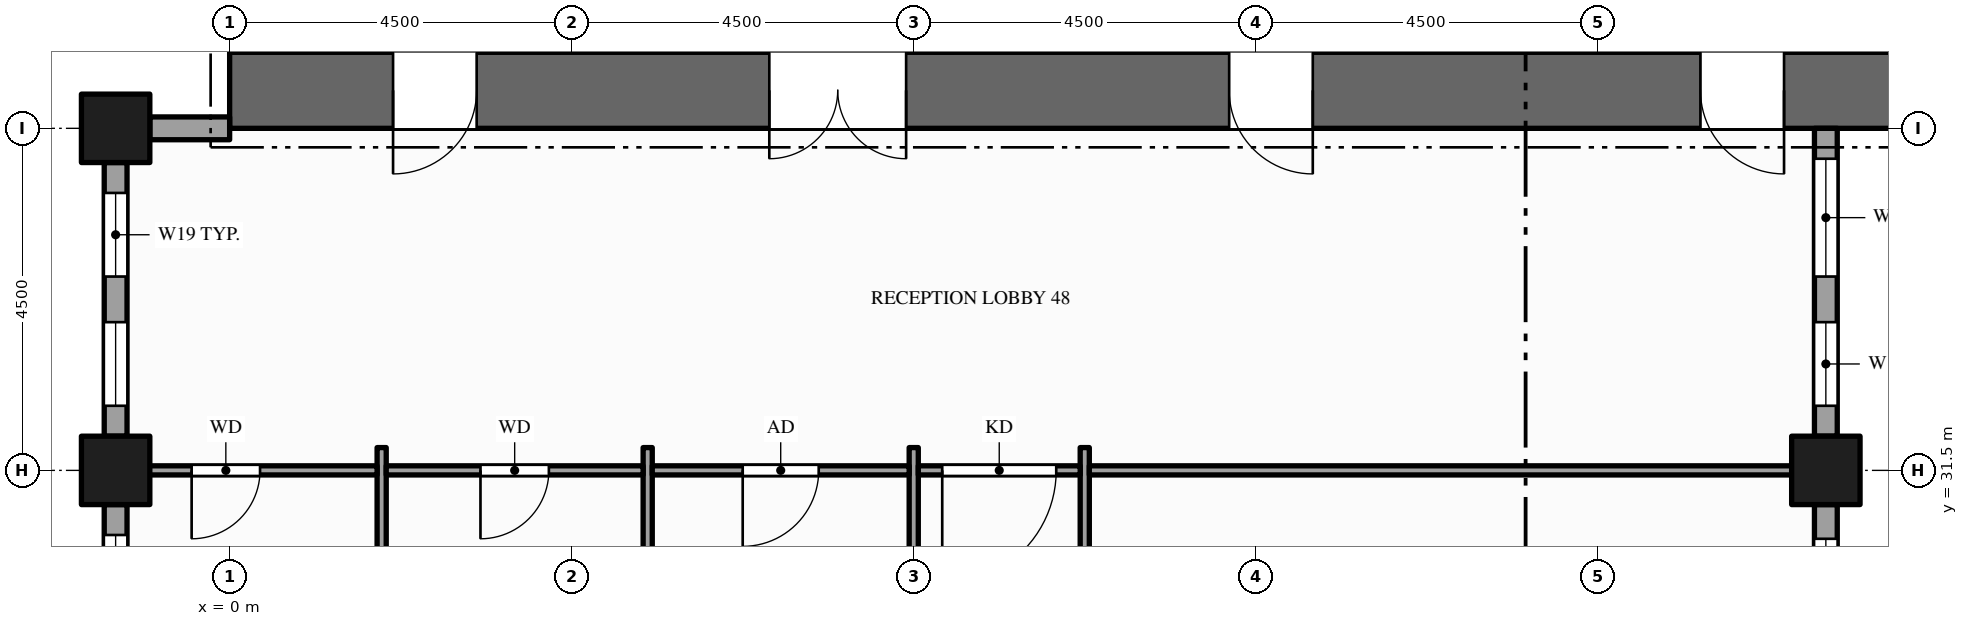
"""IFC4 building model, lengths in metres.
Left out: names, types, materials, properties, quantities, classifications, styles, units other than length and angle.
Written with IfcOpenShell. Run it as: python <this file> out.ifc"""

import sys

from ifc_helpers import new_model, si_unit, direction, frame, frame_2d, origin, origin_2d, place, context, subcontext, project, spatial, rectangle, hollow_rectangle, extrude, element, fill, save


model = new_model("IFC4")
c1 = context("Model", 3, precision=1e-05, world=origin(), true_north=direction((0.0, 1.0)))
c2 = subcontext(c1, "Body", "Model", "MODEL_VIEW")
j1 = project(units=[si_unit("LENGTHUNIT", "METRE"), si_unit("PLANEANGLEUNIT", "RADIAN")], contexts=[c1])
p1 = place(None, origin())
s1 = spatial("IfcSite", under=j1, at=p1, CompositionType="ELEMENT")
p2 = place(p1, origin())
s2 = spatial("IfcBuilding", under=s1, at=p2, CompositionType="ELEMENT")
p3 = place(p2, frame((0.0, 0.0, 143.0)))
s3 = spatial("IfcBuildingStorey", under=s2, at=p3, CompositionType="ELEMENT", Elevation=143.0)
p4 = place(p3, frame((0.0, 36.5, -0.15), z_axis=(0.0, 0.0, 1.0), x_axis=(1.0, 0.0, 0.0)))
e1 = element("IfcWall", 1, at=p4, inside=s3, PredefinedType="SHEAR", context=c2, shape_type="SweptSolid", body=[
    extrude(rectangle(XDim=22.5, YDim=1.0, at=frame_2d((11.25, 0.0))), origin(), (0.0, 0.0, 1.0), 4.0),
])
p5 = place(p4, frame((7.1, 0.0, 0.15)))
e2 = element("IfcOpeningElement", 2, at=p5, cuts=e1, PredefinedType="OPENING", context=c2, shape_type="SweptSolid", body=[
    extrude(rectangle(XDim=1.8, YDim=2.1, at=frame_2d((0.9, 1.05))), frame((0.0, 0.51, 0.0), z_axis=(0.0, -1.0, 0.0), x_axis=(1.0, 0.0, 0.0)), (0.0, 0.0, 1.0), 1.02),
])
p6 = place(p4, frame((13.15, 0.0, 0.15)))
e3 = element("IfcOpeningElement", 3, at=p6, cuts=e1, PredefinedType="OPENING", context=c2, shape_type="SweptSolid", body=[
    extrude(rectangle(XDim=1.1, YDim=2.1, at=frame_2d((0.55, 1.05))), frame((0.0, 0.51, 0.0), z_axis=(0.0, -1.0, 0.0), x_axis=(1.0, 0.0, 0.0)), (0.0, 0.0, 1.0), 1.02),
])
p7 = place(p4, frame((2.15, 0.0, 0.15)))
e4 = element("IfcOpeningElement", 4, at=p7, cuts=e1, PredefinedType="OPENING", context=c2, shape_type="SweptSolid", body=[
    extrude(rectangle(XDim=1.1, YDim=2.1, at=frame_2d((0.55, 1.05))), frame((0.0, 0.51, 0.0), z_axis=(0.0, -1.0, 0.0), x_axis=(1.0, 0.0, 0.0)), (0.0, 0.0, 1.0), 1.02),
])
p8 = place(p4, frame((19.35, 0.0, 0.15)))
e5 = element("IfcOpeningElement", 5, at=p8, cuts=e1, PredefinedType="OPENING", context=c2, shape_type="SweptSolid", body=[
    extrude(rectangle(XDim=1.1, YDim=2.1, at=frame_2d((0.55, 1.05))), frame((0.0, 0.51, 0.0), z_axis=(0.0, -1.0, 0.0), x_axis=(1.0, 0.0, 0.0)), (0.0, 0.0, 1.0), 1.02),
])
for number, where, z_axis, x_axis in (
    (6, (-1.5, 31.5, -0.15), (0.0, 0.0, 1.0), (1.0, 0.0, 0.0)),
    (7, (-1.5, 36.0, -0.15), (0.0, 0.0, 1.0), (1.0, 0.0, 0.0)),
    (8, (21.0, 31.5, -0.15), (0.0, 0.0, 1.0), (1.0, 0.0, 0.0)),
):
    element("IfcColumn", number, at=place(p3, frame(where, z_axis=z_axis, x_axis=x_axis)), inside=s3, PredefinedType="COLUMN", context=c2, shape_type="SweptSolid", body=[
        extrude(hollow_rectangle(XDim=0.9, YDim=0.9, WallThickness=0.045, at=origin_2d()), origin(), (0.0, 0.0, 1.0), 4.0),
    ])
p9 = place(p3, frame((21.0, 28.95, 0.0), z_axis=(0.0, 0.0, 1.0), x_axis=(0.0, 1.0, 0.0)))
e9 = element("IfcWall", 9, at=p9, inside=s3, PredefinedType="STANDARD", context=c2, shape_type="SweptSolid", body=[
    extrude(rectangle(XDim=2.1, YDim=0.3, at=frame_2d((1.05, 0.0))), origin(), (0.0, 0.0, 1.0), 3.149),
])
p10 = place(p9, frame((0.45, 0.0, 0.9)))
e10 = element("IfcOpeningElement", 10, at=p10, cuts=e9, PredefinedType="OPENING", context=c2, shape_type="SweptSolid", body=[
    extrude(rectangle(XDim=1.2, YDim=2.0, at=frame_2d((0.6, 1.0))), frame((0.0, 0.16, 0.0), z_axis=(0.0, -1.0, 0.0), x_axis=(1.0, 0.0, 0.0)), (0.0, 0.0, 1.0), 0.32),
])
p11 = place(p3, frame((21.0, 31.95, 0.0), z_axis=(0.0, 0.0, 1.0), x_axis=(0.0, 1.0, 0.0)))
e11 = element("IfcWall", 11, at=p11, inside=s3, PredefinedType="STANDARD", context=c2, shape_type="SweptSolid", body=[
    extrude(rectangle(XDim=4.05, YDim=0.3, at=frame_2d((2.025, 0.0))), origin(), (0.0, 0.0, 1.0), 3.149),
])
p12 = place(p11, frame((0.4, 0.0, 0.9)))
e12 = element("IfcOpeningElement", 12, at=p12, cuts=e11, PredefinedType="OPENING", context=c2, shape_type="SweptSolid", body=[
    extrude(rectangle(XDim=1.1, YDim=2.0, at=frame_2d((0.55, 1.0))), frame((0.0, 0.16, 0.0), z_axis=(0.0, -1.0, 0.0), x_axis=(1.0, 0.0, 0.0)), (0.0, 0.0, 1.0), 0.32),
])
p13 = place(p11, frame((2.1, 0.0, 0.9)))
e13 = element("IfcOpeningElement", 13, at=p13, cuts=e11, PredefinedType="OPENING", context=c2, shape_type="SweptSolid", body=[
    extrude(rectangle(XDim=1.55, YDim=2.0, at=frame_2d((0.775, 1.0))), frame((0.0, 0.16, 0.0), z_axis=(0.0, -1.0, 0.0), x_axis=(1.0, 0.0, 0.0)), (0.0, 0.0, 1.0), 0.32),
])
p14 = place(p3, frame((0.0, 36.0, 0.0), z_axis=(0.0, 0.0, 1.0), x_axis=(-1.0, 0.0, 0.0)))
e14 = element("IfcWall", 14, at=p14, inside=s3, PredefinedType="STANDARD", context=c2, shape_type="SweptSolid", body=[
    extrude(rectangle(XDim=1.05, YDim=0.3, at=frame_2d((0.525, 0.0))), origin(), (0.0, 0.0, 1.0), 2.87),
])
p15 = place(p3, frame((-1.5, 35.55, 0.0), z_axis=(0.0, 0.0, 1.0), x_axis=(0.0, -1.0, 0.0)))
e15 = element("IfcWall", 15, at=p15, inside=s3, PredefinedType="STANDARD", context=c2, shape_type="SweptSolid", body=[
    extrude(rectangle(XDim=3.6, YDim=0.3, at=frame_2d((1.8, 0.0))), origin(), (0.0, 0.0, 1.0), 3.149),
])
p16 = place(p15, frame((0.4, 0.0, 0.9)))
e16 = element("IfcOpeningElement", 16, at=p16, cuts=e15, PredefinedType="OPENING", context=c2, shape_type="SweptSolid", body=[
    extrude(rectangle(XDim=1.1, YDim=2.0, at=frame_2d((0.55, 1.0))), frame((0.0, 0.16, 0.0), z_axis=(0.0, -1.0, 0.0), x_axis=(1.0, 0.0, 0.0)), (0.0, 0.0, 1.0), 0.32),
])
p17 = place(p15, frame((2.1, 0.0, 0.9)))
e17 = element("IfcOpeningElement", 17, at=p17, cuts=e15, PredefinedType="OPENING", context=c2, shape_type="SweptSolid", body=[
    extrude(rectangle(XDim=1.1, YDim=2.0, at=frame_2d((0.55, 1.0))), frame((0.0, 0.16, 0.0), z_axis=(0.0, -1.0, 0.0), x_axis=(1.0, 0.0, 0.0)), (0.0, 0.0, 1.0), 0.32),
])
p18 = place(p3, frame((-1.5, 31.05, 0.0), z_axis=(0.0, 0.0, 1.0), x_axis=(0.0, -1.0, 0.0)))
e18 = element("IfcWall", 18, at=p18, inside=s3, PredefinedType="STANDARD", context=c2, shape_type="SweptSolid", body=[
    extrude(rectangle(XDim=3.6, YDim=0.3, at=frame_2d((1.8, 0.0))), origin(), (0.0, 0.0, 1.0), 3.149),
])
p19 = place(p18, frame((0.4, 0.0, 0.9)))
e19 = element("IfcOpeningElement", 19, at=p19, cuts=e18, PredefinedType="OPENING", context=c2, shape_type="SweptSolid", body=[
    extrude(rectangle(XDim=1.1, YDim=2.0, at=frame_2d((0.55, 1.0))), frame((0.0, 0.16, 0.0), z_axis=(0.0, -1.0, 0.0), x_axis=(1.0, 0.0, 0.0)), (0.0, 0.0, 1.0), 0.32),
])
p20 = place(p18, frame((2.1, 0.0, 0.9)))
e20 = element("IfcOpeningElement", 20, at=p20, cuts=e18, PredefinedType="OPENING", context=c2, shape_type="SweptSolid", body=[
    extrude(rectangle(XDim=1.1, YDim=2.0, at=frame_2d((0.55, 1.0))), frame((0.0, 0.16, 0.0), z_axis=(0.0, -1.0, 0.0), x_axis=(1.0, 0.0, 0.0)), (0.0, 0.0, 1.0), 0.32),
])
for number, where, z_axis, x_axis in (
    (21, (2.0, 26.7, 0.0), (0.0, 0.0, 1.0), (0.0, 1.0, 0.0)),
    (22, (5.5, 26.7, 0.0), (0.0, 0.0, 1.0), (0.0, 1.0, 0.0)),
):
    element("IfcWall", number, at=place(p3, frame(where, z_axis=z_axis, x_axis=x_axis)), inside=s3, PredefinedType="PARTITIONING", context=c2, shape_type="SweptSolid", body=[
        extrude(rectangle(XDim=5.1, YDim=0.12, at=frame_2d((2.55, 0.0))), origin(), (0.0, 0.0, 1.0), 3.85),
    ])
p21 = place(p3, frame((9.0, 10.95, 0.0), z_axis=(0.0, 0.0, 1.0), x_axis=(0.0, 1.0, 0.0)))
e23 = element("IfcWall", 23, at=p21, inside=s3, PredefinedType="PARTITIONING", context=c2, shape_type="SweptSolid", body=[
    extrude(rectangle(XDim=20.85, YDim=0.12, at=frame_2d((10.425, 0.0))), origin(), (0.0, 0.0, 1.0), 2.6),
])
p22 = place(p21, frame((2.05, 0.0, 0.0)))
e24 = element("IfcOpeningElement", 24, at=p22, cuts=e23, PredefinedType="OPENING", context=c2, shape_type="SweptSolid", body=[
    extrude(rectangle(XDim=1.0, YDim=2.1, at=frame_2d((0.5, 1.05))), frame((0.0, 0.07, 0.0), z_axis=(0.0, -1.0, 0.0), x_axis=(1.0, 0.0, 0.0)), (0.0, 0.0, 1.0), 0.14),
])
p23 = place(p21, frame((6.55, 0.0, 0.0)))
e25 = element("IfcOpeningElement", 25, at=p23, cuts=e23, PredefinedType="OPENING", context=c2, shape_type="SweptSolid", body=[
    extrude(rectangle(XDim=1.0, YDim=2.1, at=frame_2d((0.5, 1.05))), frame((0.0, 0.07, 0.0), z_axis=(0.0, -1.0, 0.0), x_axis=(1.0, 0.0, 0.0)), (0.0, 0.0, 1.0), 0.14),
])
p24 = place(p21, frame((11.805, 0.0, 0.0)))
e26 = element("IfcOpeningElement", 26, at=p24, cuts=e23, PredefinedType="OPENING", context=c2, shape_type="SweptSolid", body=[
    extrude(rectangle(XDim=1.8, YDim=2.1, at=frame_2d((0.9, 1.05))), frame((0.0, 0.07, 0.0), z_axis=(0.0, -1.0, 0.0), x_axis=(1.0, 0.0, 0.0)), (0.0, 0.0, 1.0), 0.14),
])
p25 = place(p3, frame((11.25, 10.95, 0.0), z_axis=(0.0, 0.0, 1.0), x_axis=(0.0, 1.0, 0.0)))
e27 = element("IfcWall", 27, at=p25, inside=s3, PredefinedType="PARTITIONING", context=c2, shape_type="SweptSolid", body=[
    extrude(rectangle(XDim=20.85, YDim=0.12, at=frame_2d((10.425, 0.0))), origin(), (0.0, 0.0, 1.0), 2.6),
])
p26 = place(p25, frame((17.8, 0.0, 0.0)))
e28 = element("IfcOpeningElement", 28, at=p26, cuts=e27, PredefinedType="OPENING", context=c2, shape_type="SweptSolid", body=[
    extrude(rectangle(XDim=1.0, YDim=2.1, at=frame_2d((0.5, 1.05))), frame((0.0, 0.07, 0.0), z_axis=(0.0, -1.0, 0.0), x_axis=(1.0, 0.0, 0.0)), (0.0, 0.0, 1.0), 0.14),
])
p27 = place(p25, frame((4.2, 0.0, 0.0)))
e29 = element("IfcOpeningElement", 29, at=p27, cuts=e27, PredefinedType="OPENING", context=c2, shape_type="SweptSolid", body=[
    extrude(rectangle(XDim=1.2, YDim=2.1, at=frame_2d((0.6, 1.05))), frame((0.0, 0.07, 0.0), z_axis=(0.0, -1.0, 0.0), x_axis=(1.0, 0.0, 0.0)), (0.0, 0.0, 1.0), 0.14),
])
p28 = place(p3, frame((-1.35, 31.5, 0.0), z_axis=(0.0, 0.0, 1.0), x_axis=(1.0, 0.0, 0.0)))
e30 = element("IfcWall", 30, at=p28, inside=s3, PredefinedType="PARTITIONING", context=c2, shape_type="SweptSolid", body=[
    extrude(rectangle(XDim=3.29, YDim=0.12, at=frame_2d((1.645, 0.0))), origin(), (0.0, 0.0, 1.0), 2.87),
])
p29 = place(p28, frame((0.85, 0.0, 0.0)))
e31 = element("IfcOpeningElement", 31, at=p29, cuts=e30, PredefinedType="OPENING", context=c2, shape_type="SweptSolid", body=[
    extrude(rectangle(XDim=0.9, YDim=2.1, at=frame_2d((0.45, 1.05))), frame((0.0, 0.07, 0.0), z_axis=(0.0, -1.0, 0.0), x_axis=(1.0, 0.0, 0.0)), (0.0, 0.0, 1.0), 0.14),
])
p30 = place(p3, frame((2.06, 31.5, 0.0), z_axis=(0.0, 0.0, 1.0), x_axis=(1.0, 0.0, 0.0)))
e32 = element("IfcWall", 32, at=p30, inside=s3, PredefinedType="PARTITIONING", context=c2, shape_type="SweptSolid", body=[
    extrude(rectangle(XDim=3.38, YDim=0.12, at=frame_2d((1.69, 0.0))), origin(), (0.0, 0.0, 1.0), 2.87),
])
p31 = place(p30, frame((1.24, 0.0, 0.0)))
e33 = element("IfcOpeningElement", 33, at=p31, cuts=e32, PredefinedType="OPENING", context=c2, shape_type="SweptSolid", body=[
    extrude(rectangle(XDim=0.9, YDim=2.1, at=frame_2d((0.45, 1.05))), frame((0.0, 0.07, 0.0), z_axis=(0.0, -1.0, 0.0), x_axis=(1.0, 0.0, 0.0)), (0.0, 0.0, 1.0), 0.14),
])
p32 = place(p3, frame((5.56, 31.5, 0.0), z_axis=(0.0, 0.0, 1.0), x_axis=(1.0, 0.0, 0.0)))
e34 = element("IfcWall", 34, at=p32, inside=s3, PredefinedType="PARTITIONING", context=c2, shape_type="SweptSolid", body=[
    extrude(rectangle(XDim=3.38, YDim=0.12, at=frame_2d((1.69, 0.0))), origin(), (0.0, 0.0, 1.0), 2.87),
])
p33 = place(p32, frame((1.19, 0.0, 0.0)))
e35 = element("IfcOpeningElement", 35, at=p33, cuts=e34, PredefinedType="OPENING", context=c2, shape_type="SweptSolid", body=[
    extrude(rectangle(XDim=1.0, YDim=2.1, at=frame_2d((0.5, 1.05))), frame((0.0, 0.07, 0.0), z_axis=(0.0, -1.0, 0.0), x_axis=(1.0, 0.0, 0.0)), (0.0, 0.0, 1.0), 0.14),
])
p34 = place(p3, frame((9.06, 31.5, 0.0), z_axis=(0.0, 0.0, 1.0), x_axis=(1.0, 0.0, 0.0)))
e36 = element("IfcWall", 36, at=p34, inside=s3, PredefinedType="PARTITIONING", context=c2, shape_type="SweptSolid", body=[
    extrude(rectangle(XDim=2.13, YDim=0.12, at=frame_2d((1.065, 0.0))), origin(), (0.0, 0.0, 1.0), 2.87),
])
p35 = place(p34, frame((0.315, 0.0, 0.0)))
e37 = element("IfcOpeningElement", 37, at=p35, cuts=e36, PredefinedType="OPENING", context=c2, shape_type="SweptSolid", body=[
    extrude(rectangle(XDim=1.5, YDim=2.1, at=frame_2d((0.75, 1.05))), frame((0.0, 0.07, 0.0), z_axis=(0.0, -1.0, 0.0), x_axis=(1.0, 0.0, 0.0)), (0.0, 0.0, 1.0), 0.14),
])
p36 = place(p3, frame((11.31, 31.5, 0.0), z_axis=(0.0, 0.0, 1.0), x_axis=(1.0, 0.0, 0.0)))
e38 = element("IfcWall", 38, at=p36, inside=s3, PredefinedType="PARTITIONING", context=c2, shape_type="SweptSolid", body=[
    extrude(rectangle(XDim=9.54, YDim=0.12, at=frame_2d((4.77, 0.0))), origin(), (0.0, 0.0, 1.0), 2.87),
])
p37 = place(p10, origin())
e39 = element("IfcWindow", 39, at=p37, inside=s3, PartitioningType="SINGLE_PANEL", PredefinedType="WINDOW", context=c2, shape_type="SweptSolid", body=[
    extrude(rectangle(XDim=1.2, YDim=2.0, at=frame_2d((0.6, 1.0))), frame((0.0, 0.03, 0.0), z_axis=(0.0, -1.0, 0.0), x_axis=(1.0, 0.0, 0.0)), (0.0, 0.0, 1.0), 0.06),
])
fill(e10, e39)
p38 = place(p12, origin())
e40 = element("IfcWindow", 40, at=p38, inside=s3, PartitioningType="SINGLE_PANEL", PredefinedType="WINDOW", context=c2, shape_type="SweptSolid", body=[
    extrude(rectangle(XDim=1.1, YDim=2.0, at=frame_2d((0.55, 1.0))), frame((0.0, 0.03, 0.0), z_axis=(0.0, -1.0, 0.0), x_axis=(1.0, 0.0, 0.0)), (0.0, 0.0, 1.0), 0.06),
])
fill(e12, e40)
p39 = place(p13, origin())
e41 = element("IfcWindow", 41, at=p39, inside=s3, PartitioningType="SINGLE_PANEL", PredefinedType="WINDOW", context=c2, shape_type="SweptSolid", body=[
    extrude(rectangle(XDim=1.55, YDim=2.0, at=frame_2d((0.775, 1.0))), frame((0.0, 0.03, 0.0), z_axis=(0.0, -1.0, 0.0), x_axis=(1.0, 0.0, 0.0)), (0.0, 0.0, 1.0), 0.06),
])
fill(e13, e41)
p40 = place(p16, origin())
e42 = element("IfcWindow", 42, at=p40, inside=s3, PartitioningType="SINGLE_PANEL", PredefinedType="WINDOW", context=c2, shape_type="SweptSolid", body=[
    extrude(rectangle(XDim=1.1, YDim=2.0, at=frame_2d((0.55, 1.0))), frame((0.0, 0.03, 0.0), z_axis=(0.0, -1.0, 0.0), x_axis=(1.0, 0.0, 0.0)), (0.0, 0.0, 1.0), 0.06),
])
fill(e16, e42)
p41 = place(p17, origin())
e43 = element("IfcWindow", 43, at=p41, inside=s3, PartitioningType="SINGLE_PANEL", PredefinedType="WINDOW", context=c2, shape_type="SweptSolid", body=[
    extrude(rectangle(XDim=1.1, YDim=2.0, at=frame_2d((0.55, 1.0))), frame((0.0, 0.03, 0.0), z_axis=(0.0, -1.0, 0.0), x_axis=(1.0, 0.0, 0.0)), (0.0, 0.0, 1.0), 0.06),
])
fill(e17, e43)
p42 = place(p19, origin())
e44 = element("IfcWindow", 44, at=p42, inside=s3, PartitioningType="SINGLE_PANEL", PredefinedType="WINDOW", context=c2, shape_type="SweptSolid", body=[
    extrude(rectangle(XDim=1.1, YDim=2.0, at=frame_2d((0.55, 1.0))), frame((0.0, 0.03, 0.0), z_axis=(0.0, -1.0, 0.0), x_axis=(1.0, 0.0, 0.0)), (0.0, 0.0, 1.0), 0.06),
])
fill(e19, e44)
p43 = place(p5, origin())
e45 = element("IfcDoor", 45, at=p43, inside=s3, OperationType="DOUBLE_DOOR_SINGLE_SWING", PredefinedType="DOOR", context=c2, shape_type="SweptSolid", body=[
    extrude(rectangle(XDim=1.8, YDim=2.1, at=frame_2d((0.9, 1.05))), frame((0.0, 0.025, 0.0), z_axis=(0.0, -1.0, 0.0), x_axis=(1.0, 0.0, 0.0)), (0.0, 0.0, 1.0), 0.05),
])
fill(e2, e45)
p44 = place(p6, origin())
e46 = element("IfcDoor", 46, at=p44, inside=s3, OperationType="SINGLE_SWING_RIGHT", PredefinedType="DOOR", context=c2, shape_type="SweptSolid", body=[
    extrude(rectangle(XDim=1.1, YDim=2.1, at=frame_2d((0.55, 1.05))), frame((0.0, 0.025, 0.0), z_axis=(0.0, -1.0, 0.0), x_axis=(1.0, 0.0, 0.0)), (0.0, 0.0, 1.0), 0.05),
])
fill(e3, e46)
p45 = place(p7, origin())
e47 = element("IfcDoor", 47, at=p45, inside=s3, OperationType="SINGLE_SWING_LEFT", PredefinedType="DOOR", context=c2, shape_type="SweptSolid", body=[
    extrude(rectangle(XDim=1.1, YDim=2.1, at=frame_2d((0.55, 1.05))), frame((0.0, 0.025, 0.0), z_axis=(0.0, -1.0, 0.0), x_axis=(1.0, 0.0, 0.0)), (0.0, 0.0, 1.0), 0.05),
])
fill(e4, e47)
p46 = place(p8, origin())
e48 = element("IfcDoor", 48, at=p46, inside=s3, OperationType="SINGLE_SWING_RIGHT", PredefinedType="DOOR", context=c2, shape_type="SweptSolid", body=[
    extrude(rectangle(XDim=1.1, YDim=2.1, at=frame_2d((0.55, 1.05))), frame((0.0, 0.025, 0.0), z_axis=(0.0, -1.0, 0.0), x_axis=(1.0, 0.0, 0.0)), (0.0, 0.0, 1.0), 0.05),
])
fill(e5, e48)
p47 = place(p35, origin())
e49 = element("IfcDoor", 49, at=p47, inside=s3, OperationType="SINGLE_SWING_LEFT", PredefinedType="DOOR", context=c2, shape_type="SweptSolid", body=[
    extrude(rectangle(XDim=1.5, YDim=2.1, at=frame_2d((0.75, 1.05))), frame((0.0, 0.025, 0.0), z_axis=(0.0, -1.0, 0.0), x_axis=(1.0, 0.0, 0.0)), (0.0, 0.0, 1.0), 0.05),
])
fill(e37, e49)
p48 = place(p29, origin())
e50 = element("IfcDoor", 50, at=p48, inside=s3, OperationType="SINGLE_SWING_LEFT", PredefinedType="DOOR", context=c2, shape_type="SweptSolid", body=[
    extrude(rectangle(XDim=0.9, YDim=2.1, at=frame_2d((0.45, 1.05))), frame((0.0, 0.025, 0.0), z_axis=(0.0, -1.0, 0.0), x_axis=(1.0, 0.0, 0.0)), (0.0, 0.0, 1.0), 0.05),
])
fill(e31, e50)
p49 = place(p31, origin())
e51 = element("IfcDoor", 51, at=p49, inside=s3, OperationType="SINGLE_SWING_LEFT", PredefinedType="DOOR", context=c2, shape_type="SweptSolid", body=[
    extrude(rectangle(XDim=0.9, YDim=2.1, at=frame_2d((0.45, 1.05))), frame((0.0, 0.025, 0.0), z_axis=(0.0, -1.0, 0.0), x_axis=(1.0, 0.0, 0.0)), (0.0, 0.0, 1.0), 0.05),
])
fill(e33, e51)
p50 = place(p33, origin())
e52 = element("IfcDoor", 52, at=p50, inside=s3, OperationType="SINGLE_SWING_LEFT", PredefinedType="DOOR", context=c2, shape_type="SweptSolid", body=[
    extrude(rectangle(XDim=1.0, YDim=2.1, at=frame_2d((0.5, 1.05))), frame((0.0, 0.025, 0.0), z_axis=(0.0, -1.0, 0.0), x_axis=(1.0, 0.0, 0.0)), (0.0, 0.0, 1.0), 0.05),
])
fill(e35, e52)
save(model, sys.argv[1])
